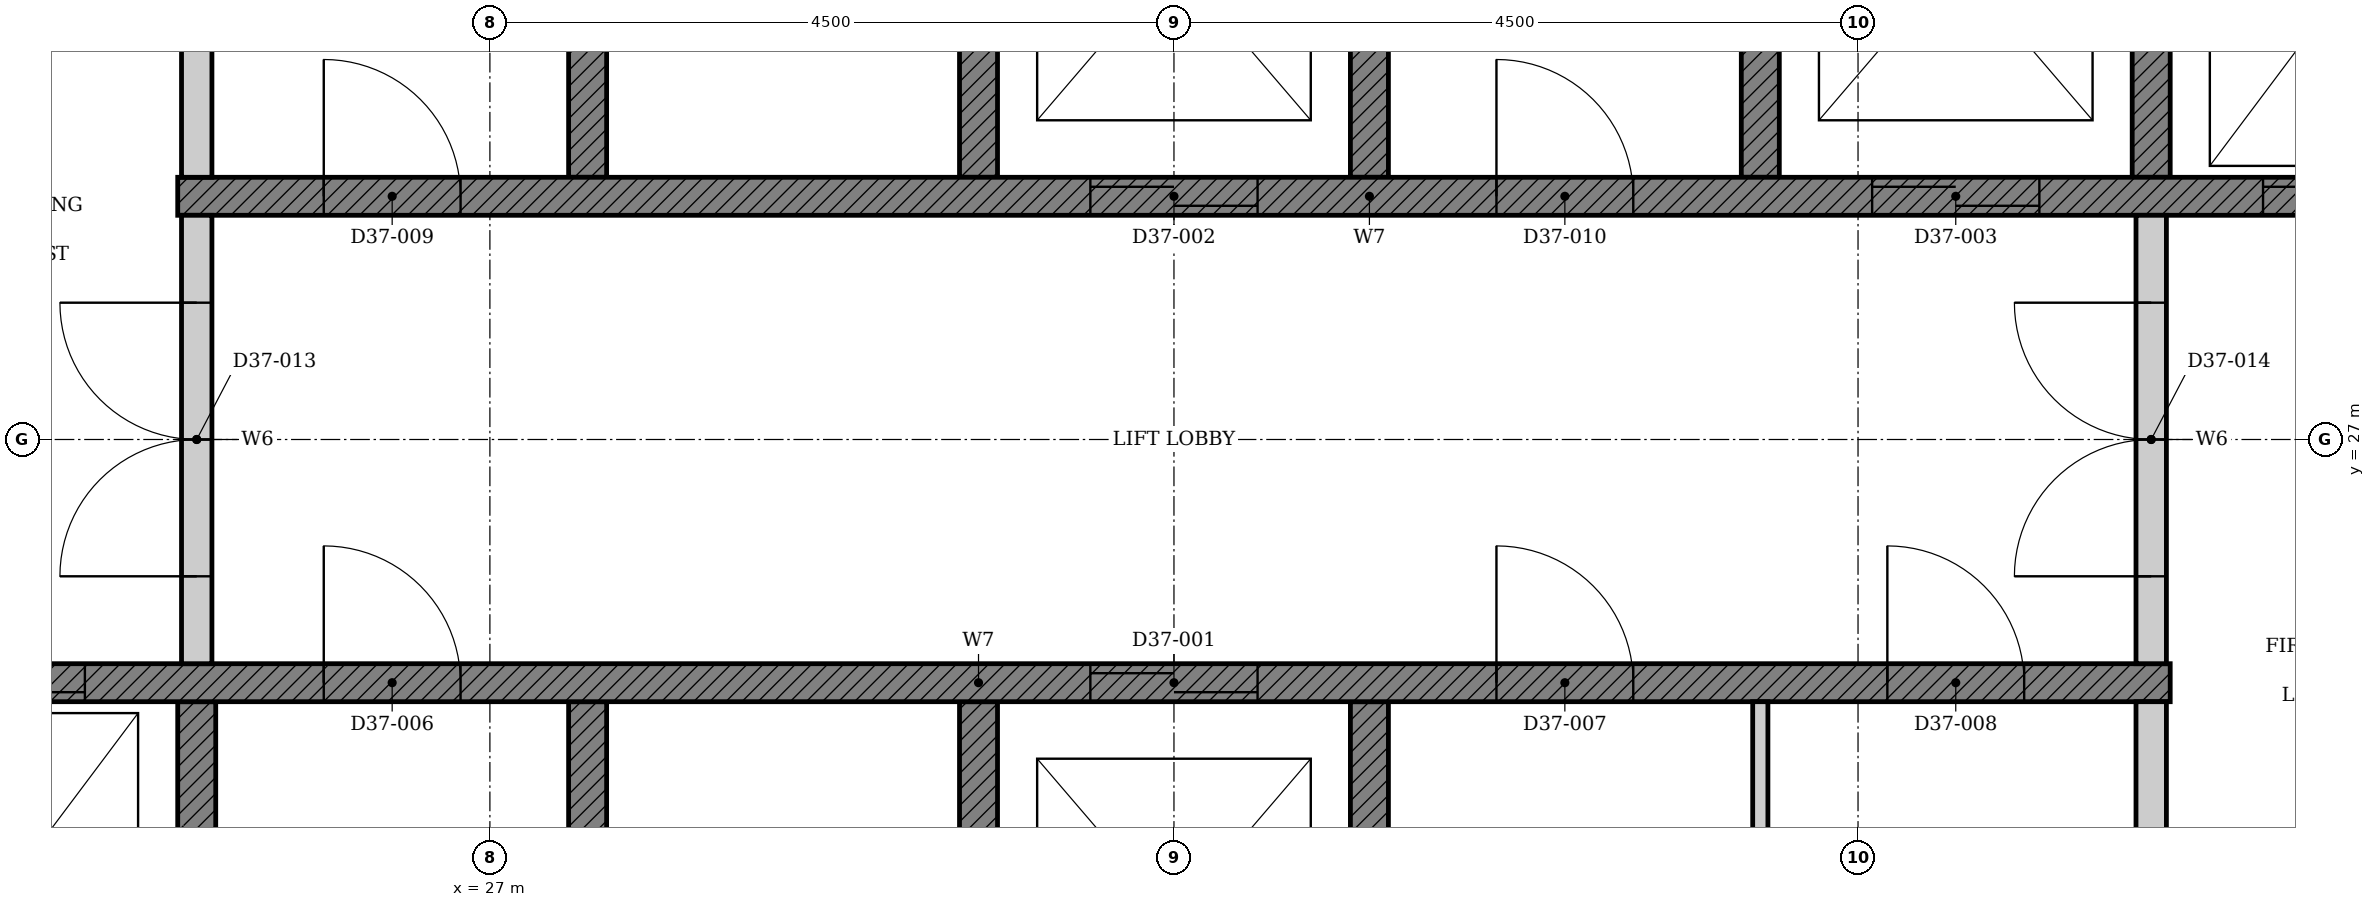
"""IFC4 building model, lengths in metres.
Left out: names, types, materials, properties, quantities, classifications, styles, units other than length and angle.
Written with IfcOpenShell. Run it as: python <this file> out.ifc"""

import sys

from ifc_helpers import new_model, si_unit, direction, frame, frame_2d, origin, place, context, subcontext, project, spatial, polyline, rectangle, outline, extrude, element, fill, save


model = new_model("IFC4")
c1 = context("Model", 3, precision=1e-05, world=origin(), true_north=direction((0.0, 1.0)))
c2 = subcontext(c1, "Body", "Model", "MODEL_VIEW")
j1 = project(units=[si_unit("LENGTHUNIT", "METRE"), si_unit("PLANEANGLEUNIT", "RADIAN")], contexts=[c1])
p1 = place(None, origin())
s1 = spatial("IfcSite", under=j1, at=p1, CompositionType="ELEMENT")
p2 = place(p1, origin())
s2 = spatial("IfcBuilding", under=s1, at=p2, CompositionType="ELEMENT")
p3 = place(p2, frame((0.0, 0.0, 150.6)))
s3 = spatial("IfcBuildingStorey", under=s2, at=p3, CompositionType="ELEMENT", Elevation=150.6)
p4 = place(p3, origin())
e1 = element("IfcWall", 1, at=p4, inside=s3, PredefinedType="SHEAR", context=c2, shape_type="SweptSolid", body=[
    extrude(outline(polyline([(22.375, 22.35), (25.197, 22.35), (25.197, 25.275), (24.947, 25.275), (24.947, 22.65), (22.625, 22.65), (22.625, 25.275), (22.375, 25.275), (22.375, 22.35)])), origin(), (0.0, 0.0, 1.0), 3.4),
])
p5 = place(p3, origin())
e2 = element("IfcWall", 2, at=p5, inside=s3, PredefinedType="SHEAR", context=c2, shape_type="SweptSolid", body=[
    extrude(outline(polyline([(27.518, 22.35), (32.911, 22.35), (32.911, 25.275), (32.661, 25.275), (32.661, 22.65), (30.339, 22.65), (30.339, 25.275), (30.089, 25.275), (30.089, 22.65), (27.768, 22.65), (27.768, 25.275), (27.518, 25.275), (27.518, 22.35)])), origin(), (0.0, 0.0, 1.0), 3.4),
])
p6 = place(p3, origin())
e3 = element("IfcWall", 3, at=p6, inside=s3, PredefinedType="SHEAR", context=c2, shape_type="SweptSolid", body=[
    extrude(outline(polyline([(27.518, 28.725), (27.768, 28.725), (27.768, 31.35), (30.089, 31.35), (30.089, 28.725), (30.339, 28.725), (30.339, 31.35), (32.661, 31.35), (32.661, 28.725), (32.911, 28.725), (32.911, 31.65), (27.518, 31.65), (27.518, 28.725)])), origin(), (0.0, 0.0, 1.0), 3.4),
])
p7 = place(p3, origin())
e4 = element("IfcWall", 4, at=p7, inside=s3, PredefinedType="SHEAR", context=c2, shape_type="SweptSolid", body=[
    extrude(outline(polyline([(35.232, 28.725), (35.482, 28.725), (35.482, 31.35), (37.803, 31.35), (37.803, 28.725), (38.053, 28.725), (38.053, 31.35), (40.375, 31.35), (40.375, 28.725), (40.625, 28.725), (40.625, 31.65), (35.232, 31.65), (35.232, 28.725)])), origin(), (0.0, 0.0, 1.0), 3.4),
])
p8 = place(p3, frame((22.375, 25.4, 0.0), z_axis=(0.0, 0.0, 1.0), x_axis=(1.0, 0.0, 0.0)))
e5 = element("IfcWall", 5, at=p8, inside=s3, PredefinedType="SHEAR", context=c2, shape_type="SweptSolid", body=[
    extrude(rectangle(XDim=15.678, YDim=0.25, at=frame_2d((7.839, 0.0))), origin(), (0.0, 0.0, 1.0), 3.4),
])
p9 = place(p8, frame((8.575, 0.0, 0.0)))
e6 = element("IfcOpeningElement", 6, at=p9, cuts=e5, PredefinedType="OPENING", context=c2, shape_type="SweptSolid", body=[
    extrude(rectangle(XDim=1.1, YDim=2.1, at=frame_2d((0.55, 1.05))), frame((0.0, 0.135, 0.0), z_axis=(0.0, -1.0, 0.0), x_axis=(1.0, 0.0, 0.0)), (0.0, 0.0, 1.0), 0.27),
])
p10 = place(p8, frame((0.861, 0.0, 0.0)))
e7 = element("IfcOpeningElement", 7, at=p10, cuts=e5, PredefinedType="OPENING", context=c2, shape_type="SweptSolid", body=[
    extrude(rectangle(XDim=1.1, YDim=2.1, at=frame_2d((0.55, 1.05))), frame((0.0, 0.135, 0.0), z_axis=(0.0, -1.0, 0.0), x_axis=(1.0, 0.0, 0.0)), (0.0, 0.0, 1.0), 0.27),
])
p11 = place(p8, frame((3.532, 0.0, 0.0)))
e8 = element("IfcOpeningElement", 8, at=p11, cuts=e5, PredefinedType="OPENING", context=c2, shape_type="SweptSolid", body=[
    extrude(rectangle(XDim=0.9, YDim=2.1, at=frame_2d((0.45, 1.05))), frame((0.0, 0.135, 0.0), z_axis=(0.0, -1.0, 0.0), x_axis=(1.0, 0.0, 0.0)), (0.0, 0.0, 1.0), 0.27),
])
p12 = place(p8, frame((11.246, 0.0, 0.0)))
e9 = element("IfcOpeningElement", 9, at=p12, cuts=e5, PredefinedType="OPENING", context=c2, shape_type="SweptSolid", body=[
    extrude(rectangle(XDim=0.9, YDim=2.1, at=frame_2d((0.45, 1.05))), frame((0.0, 0.135, 0.0), z_axis=(0.0, -1.0, 0.0), x_axis=(1.0, 0.0, 0.0)), (0.0, 0.0, 1.0), 0.27),
])
p13 = place(p8, frame((13.818, 0.0, 0.0)))
e10 = element("IfcOpeningElement", 10, at=p13, cuts=e5, PredefinedType="OPENING", context=c2, shape_type="SweptSolid", body=[
    extrude(rectangle(XDim=0.9, YDim=2.1, at=frame_2d((0.45, 1.05))), frame((0.0, 0.135, 0.0), z_axis=(0.0, -1.0, 0.0), x_axis=(1.0, 0.0, 0.0)), (0.0, 0.0, 1.0), 0.27),
])
p14 = place(p3, frame((24.947, 28.6, 0.0), z_axis=(0.0, 0.0, 1.0), x_axis=(1.0, 0.0, 0.0)))
e11 = element("IfcWall", 11, at=p14, inside=s3, PredefinedType="SHEAR", context=c2, shape_type="SweptSolid", body=[
    extrude(rectangle(XDim=15.678, YDim=0.25, at=frame_2d((7.839, 0.0))), origin(), (0.0, 0.0, 1.0), 3.4),
])
p15 = place(p14, frame((6.004, 0.0, 0.0)))
e12 = element("IfcOpeningElement", 12, at=p15, cuts=e11, PredefinedType="OPENING", context=c2, shape_type="SweptSolid", body=[
    extrude(rectangle(XDim=1.1, YDim=2.1, at=frame_2d((0.55, 1.05))), frame((0.0, 0.135, 0.0), z_axis=(0.0, -1.0, 0.0), x_axis=(1.0, 0.0, 0.0)), (0.0, 0.0, 1.0), 0.27),
])
p16 = place(p14, frame((11.146, 0.0, 0.0)))
e13 = element("IfcOpeningElement", 13, at=p16, cuts=e11, PredefinedType="OPENING", context=c2, shape_type="SweptSolid", body=[
    extrude(rectangle(XDim=1.1, YDim=2.1, at=frame_2d((0.55, 1.05))), frame((0.0, 0.135, 0.0), z_axis=(0.0, -1.0, 0.0), x_axis=(1.0, 0.0, 0.0)), (0.0, 0.0, 1.0), 0.27),
])
p17 = place(p14, frame((13.718, 0.0, 0.0)))
e14 = element("IfcOpeningElement", 14, at=p17, cuts=e11, PredefinedType="OPENING", context=c2, shape_type="SweptSolid", body=[
    extrude(rectangle(XDim=1.1, YDim=2.1, at=frame_2d((0.55, 1.05))), frame((0.0, 0.135, 0.0), z_axis=(0.0, -1.0, 0.0), x_axis=(1.0, 0.0, 0.0)), (0.0, 0.0, 1.0), 0.27),
])
p18 = place(p14, frame((0.961, 0.0, 0.0)))
e15 = element("IfcOpeningElement", 15, at=p18, cuts=e11, PredefinedType="OPENING", context=c2, shape_type="SweptSolid", body=[
    extrude(rectangle(XDim=0.9, YDim=2.1, at=frame_2d((0.45, 1.05))), frame((0.0, 0.135, 0.0), z_axis=(0.0, -1.0, 0.0), x_axis=(1.0, 0.0, 0.0)), (0.0, 0.0, 1.0), 0.27),
])
p19 = place(p14, frame((8.675, 0.0, 0.0)))
e16 = element("IfcOpeningElement", 16, at=p19, cuts=e11, PredefinedType="OPENING", context=c2, shape_type="SweptSolid", body=[
    extrude(rectangle(XDim=0.9, YDim=2.1, at=frame_2d((0.45, 1.05))), frame((0.0, 0.135, 0.0), z_axis=(0.0, -1.0, 0.0), x_axis=(1.0, 0.0, 0.0)), (0.0, 0.0, 1.0), 0.27),
])
p20 = place(p3, frame((37.928, 22.65, 0.0), z_axis=(0.0, 0.0, 1.0), x_axis=(0.0, 1.0, 0.0)))
e17 = element("IfcWall", 17, at=p20, inside=s3, PredefinedType="PARTITIONING", context=c2, shape_type="SweptSolid", body=[
    extrude(rectangle(XDim=2.625, YDim=0.2, at=frame_2d((1.312, 0.0))), origin(), (0.0, 0.0, 1.0), 3.4),
])
p21 = place(p3, frame((35.357, 22.65, 0.0), z_axis=(0.0, 0.0, 1.0), x_axis=(0.0, 1.0, 0.0)))
e18 = element("IfcWall", 18, at=p21, inside=s3, PredefinedType="PARTITIONING", context=c2, shape_type="SweptSolid", body=[
    extrude(rectangle(XDim=2.625, YDim=0.1, at=frame_2d((1.312, 0.0))), origin(), (0.0, 0.0, 1.0), 3.4),
])
p22 = place(p3, frame((25.072, 28.725, 0.0), z_axis=(0.0, 0.0, 1.0), x_axis=(0.0, 1.0, 0.0)))
e19 = element("IfcWall", 19, at=p22, inside=s3, PredefinedType="PARTITIONING", context=c2, shape_type="SweptSolid", body=[
    extrude(rectangle(XDim=2.625, YDim=0.2, at=frame_2d((1.312, 0.0))), origin(), (0.0, 0.0, 1.0), 3.4),
])
p23 = place(p3, frame((25.072, 25.525, 0.0), z_axis=(0.0, 0.0, 1.0), x_axis=(0.0, 1.0, 0.0)))
e20 = element("IfcWall", 20, at=p23, inside=s3, PredefinedType="PARTITIONING", context=c2, shape_type="SweptSolid", body=[
    extrude(rectangle(XDim=2.95, YDim=0.2, at=frame_2d((1.475, 0.0))), origin(), (0.0, 0.0, 1.0), 3.4),
])
p24 = place(p23, frame((0.575, 0.0, 0.0)))
e21 = element("IfcOpeningElement", 21, at=p24, cuts=e20, PredefinedType="OPENING", context=c2, shape_type="SweptSolid", body=[
    extrude(rectangle(XDim=1.8, YDim=2.1, at=frame_2d((0.9, 1.05))), frame((0.0, 0.11, 0.0), z_axis=(0.0, -1.0, 0.0), x_axis=(1.0, 0.0, 0.0)), (0.0, 0.0, 1.0), 0.22),
])
p25 = place(p3, frame((37.928, 25.525, 0.0), z_axis=(0.0, 0.0, 1.0), x_axis=(0.0, 1.0, 0.0)))
e22 = element("IfcWall", 22, at=p25, inside=s3, PredefinedType="PARTITIONING", context=c2, shape_type="SweptSolid", body=[
    extrude(rectangle(XDim=2.95, YDim=0.2, at=frame_2d((1.475, 0.0))), origin(), (0.0, 0.0, 1.0), 3.4),
])
p26 = place(p25, frame((0.575, 0.0, 0.0)))
e23 = element("IfcOpeningElement", 23, at=p26, cuts=e22, PredefinedType="OPENING", context=c2, shape_type="SweptSolid", body=[
    extrude(rectangle(XDim=1.8, YDim=2.1, at=frame_2d((0.9, 1.05))), frame((0.0, 0.11, 0.0), z_axis=(0.0, -1.0, 0.0), x_axis=(1.0, 0.0, 0.0)), (0.0, 0.0, 1.0), 0.22),
])
p27 = place(p9, origin())
e24 = element("IfcDoor", 24, at=p27, inside=s3, OperationType="DOUBLE_DOOR_SLIDING", PredefinedType="DOOR", context=c2, shape_type="SweptSolid", body=[
    extrude(rectangle(XDim=1.1, YDim=2.1, at=frame_2d((0.55, 1.05))), frame((0.0, 0.025, 0.0), z_axis=(0.0, -1.0, 0.0), x_axis=(1.0, 0.0, 0.0)), (0.0, 0.0, 1.0), 0.05),
])
fill(e6, e24)
p28 = place(p15, origin())
e25 = element("IfcDoor", 25, at=p28, inside=s3, OperationType="DOUBLE_DOOR_SLIDING", PredefinedType="DOOR", context=c2, shape_type="SweptSolid", body=[
    extrude(rectangle(XDim=1.1, YDim=2.1, at=frame_2d((0.55, 1.05))), frame((0.0, 0.025, 0.0), z_axis=(0.0, -1.0, 0.0), x_axis=(1.0, 0.0, 0.0)), (0.0, 0.0, 1.0), 0.05),
])
fill(e12, e25)
p29 = place(p16, origin())
e26 = element("IfcDoor", 26, at=p29, inside=s3, OperationType="DOUBLE_DOOR_SLIDING", PredefinedType="DOOR", context=c2, shape_type="SweptSolid", body=[
    extrude(rectangle(XDim=1.1, YDim=2.1, at=frame_2d((0.55, 1.05))), frame((0.0, 0.025, 0.0), z_axis=(0.0, -1.0, 0.0), x_axis=(1.0, 0.0, 0.0)), (0.0, 0.0, 1.0), 0.05),
])
fill(e13, e26)
p30 = place(p10, origin())
e27 = element("IfcDoor", 27, at=p30, inside=s3, OperationType="DOUBLE_DOOR_SLIDING", PredefinedType="DOOR", context=c2, shape_type="SweptSolid", body=[
    extrude(rectangle(XDim=1.1, YDim=2.1, at=frame_2d((0.55, 1.05))), frame((0.0, 0.025, 0.0), z_axis=(0.0, -1.0, 0.0), x_axis=(1.0, 0.0, 0.0)), (0.0, 0.0, 1.0), 0.05),
])
fill(e7, e27)
p31 = place(p17, origin())
e28 = element("IfcDoor", 28, at=p31, inside=s3, OperationType="DOUBLE_DOOR_SLIDING", PredefinedType="DOOR", context=c2, shape_type="SweptSolid", body=[
    extrude(rectangle(XDim=1.1, YDim=2.1, at=frame_2d((0.55, 1.05))), frame((0.0, 0.025, 0.0), z_axis=(0.0, -1.0, 0.0), x_axis=(1.0, 0.0, 0.0)), (0.0, 0.0, 1.0), 0.05),
])
fill(e14, e28)
p32 = place(p11, origin())
e29 = element("IfcDoor", 29, at=p32, inside=s3, OperationType="SINGLE_SWING_LEFT", PredefinedType="DOOR", context=c2, shape_type="SweptSolid", body=[
    extrude(rectangle(XDim=0.9, YDim=2.1, at=frame_2d((0.45, 1.05))), frame((0.0, 0.025, 0.0), z_axis=(0.0, -1.0, 0.0), x_axis=(1.0, 0.0, 0.0)), (0.0, 0.0, 1.0), 0.05),
])
fill(e8, e29)
p33 = place(p12, origin())
e30 = element("IfcDoor", 30, at=p33, inside=s3, OperationType="SINGLE_SWING_LEFT", PredefinedType="DOOR", context=c2, shape_type="SweptSolid", body=[
    extrude(rectangle(XDim=0.9, YDim=2.1, at=frame_2d((0.45, 1.05))), frame((0.0, 0.025, 0.0), z_axis=(0.0, -1.0, 0.0), x_axis=(1.0, 0.0, 0.0)), (0.0, 0.0, 1.0), 0.05),
])
fill(e9, e30)
p34 = place(p13, origin())
e31 = element("IfcDoor", 31, at=p34, inside=s3, OperationType="SINGLE_SWING_LEFT", PredefinedType="DOOR", context=c2, shape_type="SweptSolid", body=[
    extrude(rectangle(XDim=0.9, YDim=2.1, at=frame_2d((0.45, 1.05))), frame((0.0, 0.025, 0.0), z_axis=(0.0, -1.0, 0.0), x_axis=(1.0, 0.0, 0.0)), (0.0, 0.0, 1.0), 0.05),
])
fill(e10, e31)
p35 = place(p18, origin())
e32 = element("IfcDoor", 32, at=p35, inside=s3, OperationType="SINGLE_SWING_LEFT", PredefinedType="DOOR", context=c2, shape_type="SweptSolid", body=[
    extrude(rectangle(XDim=0.9, YDim=2.1, at=frame_2d((0.45, 1.05))), frame((0.0, 0.025, 0.0), z_axis=(0.0, -1.0, 0.0), x_axis=(1.0, 0.0, 0.0)), (0.0, 0.0, 1.0), 0.05),
])
fill(e15, e32)
p36 = place(p19, origin())
e33 = element("IfcDoor", 33, at=p36, inside=s3, OperationType="SINGLE_SWING_LEFT", PredefinedType="DOOR", context=c2, shape_type="SweptSolid", body=[
    extrude(rectangle(XDim=0.9, YDim=2.1, at=frame_2d((0.45, 1.05))), frame((0.0, 0.025, 0.0), z_axis=(0.0, -1.0, 0.0), x_axis=(1.0, 0.0, 0.0)), (0.0, 0.0, 1.0), 0.05),
])
fill(e16, e33)
p37 = place(p24, origin())
e34 = element("IfcDoor", 34, at=p37, inside=s3, OperationType="DOUBLE_DOOR_SINGLE_SWING", PredefinedType="DOOR", context=c2, shape_type="SweptSolid", body=[
    extrude(rectangle(XDim=1.8, YDim=2.1, at=frame_2d((0.9, 1.05))), frame((0.0, 0.025, 0.0), z_axis=(0.0, -1.0, 0.0), x_axis=(1.0, 0.0, 0.0)), (0.0, 0.0, 1.0), 0.05),
])
fill(e21, e34)
p38 = place(p26, origin())
e35 = element("IfcDoor", 35, at=p38, inside=s3, OperationType="DOUBLE_DOOR_SINGLE_SWING", PredefinedType="DOOR", context=c2, shape_type="SweptSolid", body=[
    extrude(rectangle(XDim=1.8, YDim=2.1, at=frame_2d((0.9, 1.05))), frame((0.0, 0.025, 0.0), z_axis=(0.0, -1.0, 0.0), x_axis=(1.0, 0.0, 0.0)), (0.0, 0.0, 1.0), 0.05),
])
fill(e23, e35)
save(model, sys.argv[1])
